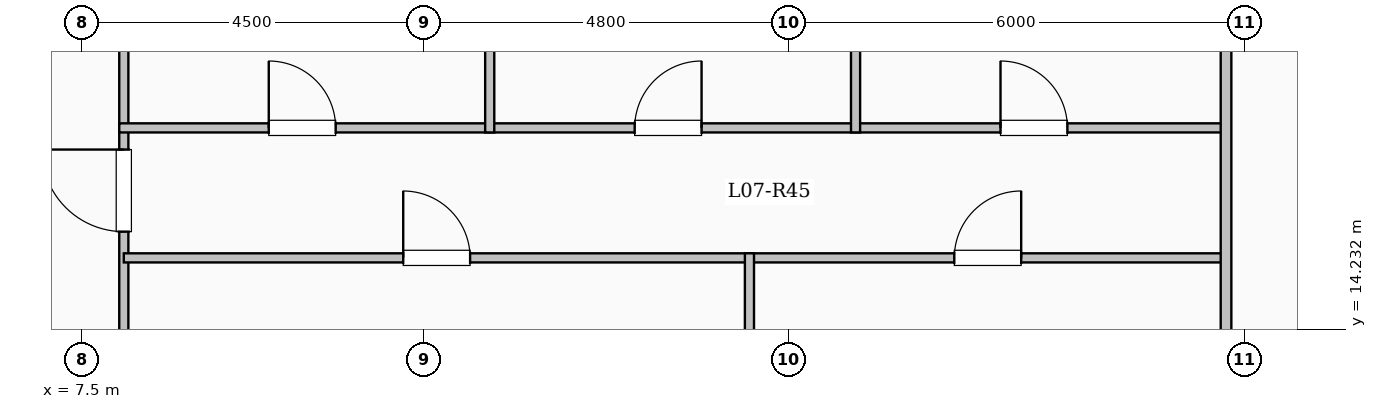
"""IFC4 building model, lengths in metres.
Left out: names, types, materials, properties, quantities, classifications, styles, units other than length and angle.
Written with IfcOpenShell. Run it as: python <this file> out.ifc"""

import sys

from ifc_helpers import new_model, si_unit, direction, frame, frame_2d, origin, place, context, subcontext, project, spatial, rectangle, extrude, element, fill, save


model = new_model("IFC4")
c1 = context("Model", 3, precision=1e-05, world=origin(), true_north=direction((0.0, 1.0)))
c2 = subcontext(c1, "Body", "Model", "MODEL_VIEW")
j1 = project(units=[si_unit("LENGTHUNIT", "METRE"), si_unit("PLANEANGLEUNIT", "RADIAN")], contexts=[c1])
p1 = place(None, origin())
s1 = spatial("IfcSite", under=j1, at=p1, CompositionType="ELEMENT")
p2 = place(p1, origin())
s2 = spatial("IfcBuilding", under=s1, at=p2, CompositionType="ELEMENT")
p3 = place(p2, frame((0.0, 0.0, 30.7)))
s3 = spatial("IfcBuildingStorey", under=s2, at=p3, CompositionType="ELEMENT", Elevation=30.7)
p4 = place(p3, frame((8.049, 12.44, 0.0), z_axis=(0.0, 0.0, 1.0), x_axis=(0.0, 1.0, 0.0)))
e1 = element("IfcWall", 1, at=p4, inside=s3, PredefinedType="PARTITIONING", context=c2, shape_type="SweptSolid", body=[
    extrude(rectangle(XDim=11.888, YDim=0.12, at=frame_2d((5.944, 0.0))), origin(), (0.0, 0.0, 1.0), 2.435),
])
p5 = place(p4, frame((3.075, 0.0, 0.0)))
e2 = element("IfcOpeningElement", 2, at=p5, cuts=e1, PredefinedType="OPENING", context=c2, shape_type="SweptSolid", body=[
    extrude(rectangle(XDim=1.08, YDim=2.15, at=frame_2d((0.54, 1.075))), frame((0.0, 0.07, 0.0), z_axis=(0.0, -1.0, 0.0), x_axis=(1.0, 0.0, 0.0)), (0.0, 0.0, 1.0), 0.14),
])
p6 = place(p3, frame((8.049, 15.17, 0.0), z_axis=(0.0, 0.0, 1.0), x_axis=(1.0, 0.0, 0.0)))
e3 = element("IfcWall", 3, at=p6, inside=s3, PredefinedType="PARTITIONING", context=c2, shape_type="SweptSolid", body=[
    extrude(rectangle(XDim=8.231, YDim=0.12, at=frame_2d((4.115, 0.0))), origin(), (0.0, 0.0, 1.0), 3.1),
])
p7 = place(p6, frame((3.676, 0.0, 0.0)))
e4 = element("IfcOpeningElement", 4, at=p7, cuts=e3, PredefinedType="OPENING", context=c2, shape_type="SweptSolid", body=[
    extrude(rectangle(XDim=0.88, YDim=2.1, at=frame_2d((0.44, 1.05))), frame((0.0, 0.07, 0.0), z_axis=(0.0, -1.0, 0.0), x_axis=(1.0, 0.0, 0.0)), (0.0, 0.0, 1.0), 0.14),
])
p8 = place(p3, frame((16.28, 15.17, 0.0), z_axis=(0.0, 0.0, 1.0), x_axis=(1.0, 0.0, 0.0)))
e5 = element("IfcWall", 5, at=p8, inside=s3, PredefinedType="PARTITIONING", context=c2, shape_type="SweptSolid", body=[
    extrude(rectangle(XDim=6.27, YDim=0.12, at=frame_2d((3.135, 0.0))), origin(), (0.0, 0.0, 1.0), 3.1),
])
p9 = place(p8, frame((2.695, 0.0, 0.0)))
e6 = element("IfcOpeningElement", 6, at=p9, cuts=e5, PredefinedType="OPENING", context=c2, shape_type="SweptSolid", body=[
    extrude(rectangle(XDim=0.88, YDim=2.1, at=frame_2d((0.44, 1.05))), frame((0.0, 0.07, 0.0), z_axis=(0.0, -1.0, 0.0), x_axis=(1.0, 0.0, 0.0)), (0.0, 0.0, 1.0), 0.14),
])
p10 = place(p3, frame((7.989, 16.88, 0.0), z_axis=(0.0, 0.0, 1.0), x_axis=(1.0, 0.0, 0.0)))
e7 = element("IfcWall", 7, at=p10, inside=s3, PredefinedType="PARTITIONING", context=c2, shape_type="SweptSolid", body=[
    extrude(rectangle(XDim=14.621, YDim=0.12, at=frame_2d((7.311, 0.0))), origin(), (0.0, 0.0, 1.0), 3.1),
])
p11 = place(p10, frame((1.967, 0.0, 0.0)))
e8 = element("IfcOpeningElement", 8, at=p11, cuts=e7, PredefinedType="OPENING", context=c2, shape_type="SweptSolid", body=[
    extrude(rectangle(XDim=0.88, YDim=2.1, at=frame_2d((0.44, 1.05))), frame((0.0, 0.07, 0.0), z_axis=(0.0, -1.0, 0.0), x_axis=(1.0, 0.0, 0.0)), (0.0, 0.0, 1.0), 0.14),
])
p12 = place(p10, frame((6.781, 0.0, 0.0)))
e9 = element("IfcOpeningElement", 9, at=p12, cuts=e7, PredefinedType="OPENING", context=c2, shape_type="SweptSolid", body=[
    extrude(rectangle(XDim=0.88, YDim=2.1, at=frame_2d((0.44, 1.05))), frame((0.0, 0.07, 0.0), z_axis=(0.0, -1.0, 0.0), x_axis=(1.0, 0.0, 0.0)), (0.0, 0.0, 1.0), 0.14),
])
p13 = place(p10, frame((11.594, 0.0, 0.0)))
e10 = element("IfcOpeningElement", 10, at=p13, cuts=e7, PredefinedType="OPENING", context=c2, shape_type="SweptSolid", body=[
    extrude(rectangle(XDim=0.88, YDim=2.1, at=frame_2d((0.44, 1.05))), frame((0.0, 0.07, 0.0), z_axis=(0.0, -1.0, 0.0), x_axis=(1.0, 0.0, 0.0)), (0.0, 0.0, 1.0), 0.14),
])
p14 = place(p3, frame((16.28, 12.44, 0.0), z_axis=(0.0, 0.0, 1.0), x_axis=(0.0, 1.0, 0.0)))
e11 = element("IfcWall", 11, at=p14, inside=s3, PredefinedType="PARTITIONING", context=c2, shape_type="SweptSolid", body=[
    extrude(rectangle(XDim=2.79, YDim=0.12, at=frame_2d((1.395, 0.0))), origin(), (0.0, 0.0, 1.0), 3.1),
])
for number, where, z_axis, x_axis in (
    (12, (12.863, 16.82, 0.0), (0.0, 0.0, 1.0), (0.0, 1.0, 0.0)),
    (13, (17.676, 16.82, 0.0), (0.0, 0.0, 1.0), (0.0, 1.0, 0.0)),
):
    element("IfcWall", number, at=place(p3, frame(where, z_axis=z_axis, x_axis=x_axis)), inside=s3, PredefinedType="PARTITIONING", context=c2, shape_type="SweptSolid", body=[
        extrude(rectangle(XDim=6.78, YDim=0.12, at=frame_2d((3.39, 0.0))), origin(), (0.0, 0.0, 1.0), 3.1),
    ])
p15 = place(p3, frame((22.55, 12.5, 0.0), z_axis=(0.0, 0.0, 1.0), x_axis=(0.0, 1.0, 0.0)))
e14 = element("IfcWall", 14, at=p15, inside=s3, PredefinedType="PARTITIONING", context=c2, shape_type="SweptSolid", body=[
    extrude(rectangle(XDim=6.55, YDim=0.14, at=frame_2d((3.275, 0.0))), origin(), (0.0, 0.0, 1.0), 3.1),
])
p16 = place(p5, origin())
e15 = element("IfcDoor", 15, at=p16, inside=s3, OperationType="SINGLE_SWING_RIGHT", PredefinedType="DOOR", context=c2, shape_type="SweptSolid", body=[
    extrude(rectangle(XDim=1.08, YDim=2.15, at=frame_2d((0.54, 1.075))), frame((0.0, 0.025, 0.0), z_axis=(0.0, -1.0, 0.0), x_axis=(1.0, 0.0, 0.0)), (0.0, 0.0, 1.0), 0.05),
])
fill(e2, e15)
p17 = place(p7, origin())
e16 = element("IfcDoor", 16, at=p17, inside=s3, OperationType="SINGLE_SWING_LEFT", PredefinedType="DOOR", context=c2, shape_type="SweptSolid", body=[
    extrude(rectangle(XDim=0.88, YDim=2.1, at=frame_2d((0.44, 1.05))), frame((0.0, 0.025, 0.0), z_axis=(0.0, -1.0, 0.0), x_axis=(1.0, 0.0, 0.0)), (0.0, 0.0, 1.0), 0.05),
])
fill(e4, e16)
p18 = place(p9, origin())
e17 = element("IfcDoor", 17, at=p18, inside=s3, OperationType="SINGLE_SWING_RIGHT", PredefinedType="DOOR", context=c2, shape_type="SweptSolid", body=[
    extrude(rectangle(XDim=0.88, YDim=2.1, at=frame_2d((0.44, 1.05))), frame((0.0, 0.025, 0.0), z_axis=(0.0, -1.0, 0.0), x_axis=(1.0, 0.0, 0.0)), (0.0, 0.0, 1.0), 0.05),
])
fill(e6, e17)
p19 = place(p11, origin())
e18 = element("IfcDoor", 18, at=p19, inside=s3, OperationType="SINGLE_SWING_LEFT", PredefinedType="DOOR", context=c2, shape_type="SweptSolid", body=[
    extrude(rectangle(XDim=0.88, YDim=2.1, at=frame_2d((0.44, 1.05))), frame((0.0, 0.025, 0.0), z_axis=(0.0, -1.0, 0.0), x_axis=(1.0, 0.0, 0.0)), (0.0, 0.0, 1.0), 0.05),
])
fill(e8, e18)
p20 = place(p12, origin())
e19 = element("IfcDoor", 19, at=p20, inside=s3, OperationType="SINGLE_SWING_RIGHT", PredefinedType="DOOR", context=c2, shape_type="SweptSolid", body=[
    extrude(rectangle(XDim=0.88, YDim=2.1, at=frame_2d((0.44, 1.05))), frame((0.0, 0.025, 0.0), z_axis=(0.0, -1.0, 0.0), x_axis=(1.0, 0.0, 0.0)), (0.0, 0.0, 1.0), 0.05),
])
fill(e9, e19)
p21 = place(p13, origin())
e20 = element("IfcDoor", 20, at=p21, inside=s3, OperationType="SINGLE_SWING_LEFT", PredefinedType="DOOR", context=c2, shape_type="SweptSolid", body=[
    extrude(rectangle(XDim=0.88, YDim=2.1, at=frame_2d((0.44, 1.05))), frame((0.0, 0.025, 0.0), z_axis=(0.0, -1.0, 0.0), x_axis=(1.0, 0.0, 0.0)), (0.0, 0.0, 1.0), 0.05),
])
fill(e10, e20)
save(model, sys.argv[1])
